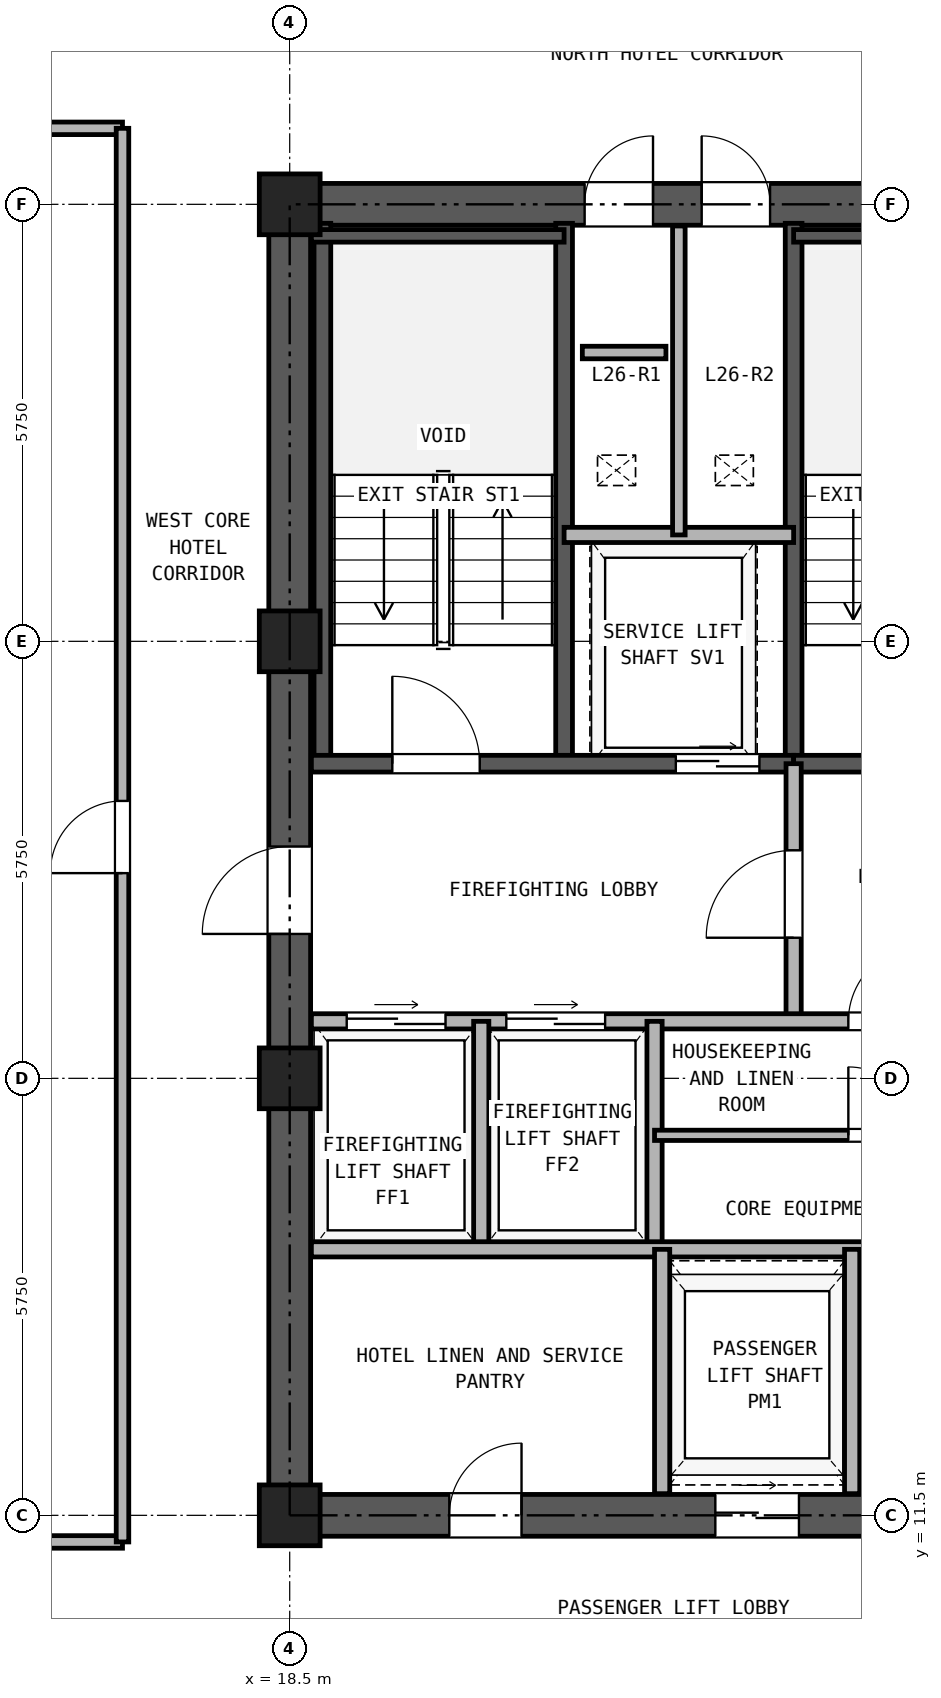
"""IFC4 building model, lengths in metres.
Left out: names, types, materials, properties, quantities, classifications, styles, units other than length and angle.
Written with IfcOpenShell. Run it as: python <this file> out.ifc"""

import sys

from ifc_helpers import new_model, si_unit, direction, frame, frame_2d, origin, origin_2d, place, context, subcontext, project, spatial, rectangle, hollow_rectangle, extrude, source, transform, mapped, element, fill, save


model = new_model("IFC4")
c1 = context("Model", 3, precision=1e-05, world=origin(), true_north=direction((0.0, 1.0)))
c2 = subcontext(c1, "Body", "Model", "MODEL_VIEW")
j1 = project(units=[si_unit("LENGTHUNIT", "METRE"), si_unit("PLANEANGLEUNIT", "RADIAN")], contexts=[c1])
p1 = place(None, origin())
s1 = spatial("IfcSite", under=j1, at=p1, CompositionType="ELEMENT")
p2 = place(p1, origin())
s2 = spatial("IfcBuilding", under=s1, at=p2, CompositionType="ELEMENT")
p3 = place(p2, frame((0.0, 0.0, 99.1)))
s3 = spatial("IfcBuildingStorey", under=s2, at=p3, CompositionType="ELEMENT", Elevation=99.1)
m1 = source(origin(), c2, "Body", "SweptSolid", [
    extrude(hollow_rectangle(XDim=0.8, YDim=0.8, WallThickness=0.045, at=origin_2d()), origin(), (0.0, 0.0, 1.0), 2.95),
])
for number, where, z_axis, x_axis in (
    (1, (18.5, 11.5, 0.0), (0.0, 0.0, 1.0), (1.0, 0.0, 0.0)),
    (2, (18.5, 17.25, 0.0), (0.0, 0.0, 1.0), (1.0, 0.0, 0.0)),
    (3, (18.5, 23.0, 0.0), (0.0, 0.0, 1.0), (1.0, 0.0, 0.0)),
    (4, (18.5, 28.75, 0.0), (0.0, 0.0, 1.0), (1.0, 0.0, 0.0)),
):
    element("IfcColumn", number, at=place(p3, frame(where, z_axis=z_axis, x_axis=x_axis)), inside=s3, PredefinedType="COLUMN", context=c2, shape_type="MappedRepresentation", body=[
        mapped(m1, transform((0.0, 0.0, 0.0), x_axis=(1.0, 0.0, 0.0), y_axis=(0.0, 1.0, 0.0), z_axis=(0.0, 0.0, 1.0), scale=1.0)),
    ])
p4 = place(p3, frame((18.225, 11.5, 0.0), z_axis=(0.0, 0.0, 1.0), x_axis=(1.0, 0.0, 0.0)))
e5 = element("IfcWall", 5, at=p4, inside=s3, PredefinedType="SHEAR", context=c2, shape_type="SweptSolid", body=[
    extrude(rectangle(XDim=10.55, YDim=0.55, at=frame_2d((5.275, 0.0))), origin(), (0.0, 0.0, 1.0), 2.95),
])
p5 = place(p4, frame((2.375, 0.0, 0.0)))
e6 = element("IfcOpeningElement", 6, at=p5, cuts=e5, PredefinedType="OPENING", context=c2, shape_type="SweptSolid", body=[
    extrude(rectangle(XDim=0.95, YDim=2.15, at=frame_2d((0.475, 1.075))), frame((0.0, 0.285, 0.0), z_axis=(0.0, -1.0, 0.0), x_axis=(1.0, 0.0, 0.0)), (0.0, 0.0, 1.0), 0.57),
])
p6 = place(p4, frame((5.875, 0.0, 0.0)))
e7 = element("IfcOpeningElement", 7, at=p6, cuts=e5, PredefinedType="OPENING", context=c2, shape_type="SweptSolid", body=[
    extrude(rectangle(XDim=1.1, YDim=2.25, at=frame_2d((0.55, 1.125))), frame((0.0, 0.285, 0.0), z_axis=(0.0, -1.0, 0.0), x_axis=(1.0, 0.0, 0.0)), (0.0, 0.0, 1.0), 0.57),
])
p7 = place(p4, frame((8.275, 0.0, 0.0)))
e8 = element("IfcOpeningElement", 8, at=p7, cuts=e5, PredefinedType="OPENING", context=c2, shape_type="SweptSolid", body=[
    extrude(rectangle(XDim=1.1, YDim=2.25, at=frame_2d((0.55, 1.125))), frame((0.0, 0.285, 0.0), z_axis=(0.0, -1.0, 0.0), x_axis=(1.0, 0.0, 0.0)), (0.0, 0.0, 1.0), 0.57),
])
p8 = place(p3, frame((18.225, 28.75, 0.0), z_axis=(0.0, 0.0, 1.0), x_axis=(1.0, 0.0, 0.0)))
e9 = element("IfcWall", 9, at=p8, inside=s3, PredefinedType="SHEAR", context=c2, shape_type="SweptSolid", body=[
    extrude(rectangle(XDim=10.55, YDim=0.55, at=frame_2d((5.275, 0.0))), origin(), (0.0, 0.0, 1.0), 2.95),
])
p9 = place(p8, frame((4.155, 0.0, 0.0)))
e10 = element("IfcOpeningElement", 10, at=p9, cuts=e9, PredefinedType="OPENING", context=c2, shape_type="SweptSolid", body=[
    extrude(rectangle(XDim=0.9, YDim=2.05, at=frame_2d((0.45, 1.025))), frame((0.0, 0.285, 0.0), z_axis=(0.0, -1.0, 0.0), x_axis=(1.0, 0.0, 0.0)), (0.0, 0.0, 1.0), 0.57),
])
p10 = place(p8, frame((5.695, 0.0, 0.0)))
e11 = element("IfcOpeningElement", 11, at=p10, cuts=e9, PredefinedType="OPENING", context=c2, shape_type="SweptSolid", body=[
    extrude(rectangle(XDim=0.9, YDim=2.05, at=frame_2d((0.45, 1.025))), frame((0.0, 0.285, 0.0), z_axis=(0.0, -1.0, 0.0), x_axis=(1.0, 0.0, 0.0)), (0.0, 0.0, 1.0), 0.57),
])
p11 = place(p3, frame((18.5, 11.775, 0.0), z_axis=(0.0, 0.0, 1.0), x_axis=(0.0, 1.0, 0.0)))
e12 = element("IfcWall", 12, at=p11, inside=s3, PredefinedType="SHEAR", context=c2, shape_type="SweptSolid", body=[
    extrude(rectangle(XDim=16.7, YDim=0.55, at=frame_2d((8.35, 0.0))), origin(), (0.0, 0.0, 1.0), 2.95),
])
p12 = place(p11, frame((7.375, 0.0, 0.0)))
e13 = element("IfcOpeningElement", 13, at=p12, cuts=e12, PredefinedType="OPENING", context=c2, shape_type="SweptSolid", body=[
    extrude(rectangle(XDim=1.15, YDim=2.2, at=frame_2d((0.575, 1.1))), frame((0.0, 0.285, 0.0), z_axis=(0.0, -1.0, 0.0), x_axis=(1.0, 0.0, 0.0)), (0.0, 0.0, 1.0), 0.57),
])
for number, where, z_axis, x_axis in (
    (14, (18.93, 21.39, 0.0), (0.0, 0.0, 1.0), (0.0, 1.0, 0.0)),
    (15, (22.11, 21.39, 0.0), (0.0, 0.0, 1.0), (0.0, 1.0, 0.0)),
    (16, (25.13, 21.39, 0.0), (0.0, 0.0, 1.0), (0.0, 1.0, 0.0)),
):
    element("IfcWall", number, at=place(p3, frame(where, z_axis=z_axis, x_axis=x_axis)), inside=s3, PredefinedType="SOLIDWALL", context=c2, shape_type="SweptSolid", body=[
        extrude(rectangle(XDim=7.11, YDim=0.22, at=frame_2d((3.555, 0.0))), origin(), (0.0, 0.0, 1.0), 2.95),
    ])
p13 = place(p3, frame((18.785, 28.335, 0.0), z_axis=(0.0, 0.0, 1.0), x_axis=(1.0, 0.0, 0.0)))
e17 = element("IfcWall", 17, at=p13, inside=s3, PredefinedType="PARTITIONING", context=c2, shape_type="SweptSolid", body=[
    extrude(rectangle(XDim=3.325, YDim=0.165, at=frame_2d((1.663, 0.0))), origin(), (0.0, 0.0, 1.0), 2.95),
])
p14 = place(p3, frame((25.13, 28.335, 0.0), z_axis=(0.0, 0.0, 1.0), x_axis=(1.0, 0.0, 0.0)))
e18 = element("IfcWall", 18, at=p14, inside=s3, PredefinedType="PARTITIONING", context=c2, shape_type="SweptSolid", body=[
    extrude(rectangle(XDim=3.085, YDim=0.165, at=frame_2d((1.542, 0.0))), origin(), (0.0, 0.0, 1.0), 2.95),
])
p15 = place(p3, frame((18.785, 21.39, 0.0), z_axis=(0.0, 0.0, 1.0), x_axis=(1.0, 0.0, 0.0)))
e19 = element("IfcWall", 19, at=p15, inside=s3, PredefinedType="SOLIDWALL", context=c2, shape_type="SweptSolid", body=[
    extrude(rectangle(XDim=6.345, YDim=0.22, at=frame_2d((3.172, 0.0))), origin(), (0.0, 0.0, 1.0), 2.95),
])
p16 = place(p15, frame((1.065, 0.0, 0.0)))
e20 = element("IfcOpeningElement", 20, at=p16, cuts=e19, PredefinedType="OPENING", context=c2, shape_type="SweptSolid", body=[
    extrude(rectangle(XDim=1.15, YDim=2.2, at=frame_2d((0.575, 1.1))), frame((0.0, 0.12, 0.0), z_axis=(0.0, -1.0, 0.0), x_axis=(1.0, 0.0, 0.0)), (0.0, 0.0, 1.0), 0.24),
])
p17 = place(p15, frame((4.795, 0.0, 0.0)))
e21 = element("IfcOpeningElement", 21, at=p17, cuts=e19, PredefinedType="OPENING", context=c2, shape_type="SweptSolid", body=[
    extrude(rectangle(XDim=1.1, YDim=2.25, at=frame_2d((0.55, 1.125))), frame((0.0, 0.12, 0.0), z_axis=(0.0, -1.0, 0.0), x_axis=(1.0, 0.0, 0.0)), (0.0, 0.0, 1.0), 0.24),
])
p18 = place(p3, frame((25.13, 21.39, 0.0), z_axis=(0.0, 0.0, 1.0), x_axis=(1.0, 0.0, 0.0)))
e22 = element("IfcWall", 22, at=p18, inside=s3, PredefinedType="SOLIDWALL", context=c2, shape_type="SweptSolid", body=[
    extrude(rectangle(XDim=3.085, YDim=0.22, at=frame_2d((1.542, 0.0))), origin(), (0.0, 0.0, 1.0), 2.95),
])
p19 = place(p18, frame((0.92, 0.0, 0.0)))
e23 = element("IfcOpeningElement", 23, at=p19, cuts=e22, PredefinedType="OPENING", context=c2, shape_type="SweptSolid", body=[
    extrude(rectangle(XDim=1.15, YDim=2.2, at=frame_2d((0.575, 1.1))), frame((0.0, 0.12, 0.0), z_axis=(0.0, -1.0, 0.0), x_axis=(1.0, 0.0, 0.0)), (0.0, 0.0, 1.0), 0.24),
])
p20 = place(p3, frame((22.11, 24.4, 0.0), z_axis=(0.0, 0.0, 1.0), x_axis=(1.0, 0.0, 0.0)))
e24 = element("IfcWall", 24, at=p20, inside=s3, PredefinedType="PARTITIONING", context=c2, shape_type="SweptSolid", body=[
    extrude(rectangle(XDim=3.02, YDim=0.2, at=frame_2d((1.51, 0.0))), origin(), (0.0, 0.0, 1.0), 2.95),
])
p21 = place(p3, frame((23.62, 24.4, 0.0), z_axis=(0.0, 0.0, 1.0), x_axis=(0.0, 1.0, 0.0)))
e25 = element("IfcWall", 25, at=p21, inside=s3, PredefinedType="PARTITIONING", context=c2, shape_type="SweptSolid", body=[
    extrude(rectangle(XDim=4.065, YDim=0.165, at=frame_2d((2.033, 0.0))), origin(), (0.0, 0.0, 1.0), 2.95),
])
p22 = place(p3, frame((25.13, 18.0, 0.0), z_axis=(0.0, 0.0, 1.0), x_axis=(0.0, 1.0, 0.0)))
e26 = element("IfcWall", 26, at=p22, inside=s3, PredefinedType="PARTITIONING", context=c2, shape_type="SweptSolid", body=[
    extrude(rectangle(XDim=3.39, YDim=0.2, at=frame_2d((1.695, 0.0))), origin(), (0.0, 0.0, 1.0), 2.95),
])
p23 = place(p22, frame((1.1, 0.0, 0.0)))
e27 = element("IfcOpeningElement", 27, at=p23, cuts=e26, PredefinedType="OPENING", context=c2, shape_type="SweptSolid", body=[
    extrude(rectangle(XDim=1.15, YDim=2.2, at=frame_2d((0.575, 1.1))), frame((0.0, 0.11, 0.0), z_axis=(0.0, -1.0, 0.0), x_axis=(1.0, 0.0, 0.0)), (0.0, 0.0, 1.0), 0.22),
])
p24 = place(p3, frame((18.785, 18.0, 0.0), z_axis=(0.0, 0.0, 1.0), x_axis=(1.0, 0.0, 0.0)))
e28 = element("IfcWall", 28, at=p24, inside=s3, PredefinedType="PARTITIONING", context=c2, shape_type="SweptSolid", body=[
    extrude(rectangle(XDim=9.43, YDim=0.2, at=frame_2d((4.715, 0.0))), origin(), (0.0, 0.0, 1.0), 2.95),
])
p25 = place(p24, frame((0.465, 0.0, 0.0)))
e29 = element("IfcOpeningElement", 29, at=p25, cuts=e28, PredefinedType="OPENING", context=c2, shape_type="SweptSolid", body=[
    extrude(rectangle(XDim=1.3, YDim=2.3, at=frame_2d((0.65, 1.15))), frame((0.0, 0.11, 0.0), z_axis=(0.0, -1.0, 0.0), x_axis=(1.0, 0.0, 0.0)), (0.0, 0.0, 1.0), 0.22),
])
p26 = place(p24, frame((2.565, 0.0, 0.0)))
e30 = element("IfcOpeningElement", 30, at=p26, cuts=e28, PredefinedType="OPENING", context=c2, shape_type="SweptSolid", body=[
    extrude(rectangle(XDim=1.3, YDim=2.3, at=frame_2d((0.65, 1.15))), frame((0.0, 0.11, 0.0), z_axis=(0.0, -1.0, 0.0), x_axis=(1.0, 0.0, 0.0)), (0.0, 0.0, 1.0), 0.22),
])
p27 = place(p24, frame((7.065, 0.0, 0.0)))
e31 = element("IfcOpeningElement", 31, at=p27, cuts=e28, PredefinedType="OPENING", context=c2, shape_type="SweptSolid", body=[
    extrude(rectangle(XDim=1.0, YDim=2.15, at=frame_2d((0.5, 1.075))), frame((0.0, 0.11, 0.0), z_axis=(0.0, -1.0, 0.0), x_axis=(1.0, 0.0, 0.0)), (0.0, 0.0, 1.0), 0.22),
])
for number, where, z_axis, x_axis in (
    (32, (21.02, 15.0, 0.0), (0.0, 0.0, 1.0), (0.0, 1.0, 0.0)),
    (33, (23.3, 15.0, 0.0), (0.0, 0.0, 1.0), (0.0, 1.0, 0.0)),
):
    element("IfcWall", number, at=place(p3, frame(where, z_axis=z_axis, x_axis=x_axis)), inside=s3, PredefinedType="PARTITIONING", context=c2, shape_type="SweptSolid", body=[
        extrude(rectangle(XDim=3.0, YDim=0.2, at=frame_2d((1.5, 0.0))), origin(), (0.0, 0.0, 1.0), 2.95),
    ])
p28 = place(p3, frame((18.785, 15.0, 0.0), z_axis=(0.0, 0.0, 1.0), x_axis=(1.0, 0.0, 0.0)))
e34 = element("IfcWall", 34, at=p28, inside=s3, PredefinedType="PARTITIONING", context=c2, shape_type="SweptSolid", body=[
    extrude(rectangle(XDim=9.43, YDim=0.2, at=frame_2d((4.715, 0.0))), origin(), (0.0, 0.0, 1.0), 2.95),
])
p29 = place(p3, frame((23.3, 16.5, 0.0), z_axis=(0.0, 0.0, 1.0), x_axis=(1.0, 0.0, 0.0)))
e35 = element("IfcWall", 35, at=p29, inside=s3, PredefinedType="PARTITIONING", context=c2, shape_type="SweptSolid", body=[
    extrude(rectangle(XDim=4.915, YDim=0.135, at=frame_2d((2.458, 0.0))), origin(), (0.0, 0.0, 1.0), 2.95),
])
p30 = place(p29, frame((2.55, 0.0, 0.0)))
e36 = element("IfcOpeningElement", 36, at=p30, cuts=e35, PredefinedType="OPENING", context=c2, shape_type="SweptSolid", body=[
    extrude(rectangle(XDim=0.9, YDim=2.05, at=frame_2d((0.45, 1.025))), frame((0.0, 0.077, 0.0), z_axis=(0.0, -1.0, 0.0), x_axis=(1.0, 0.0, 0.0)), (0.0, 0.0, 1.0), 0.155),
])
for number, where, z_axis, x_axis in (
    (37, (23.4, 11.785, 0.0), (0.0, 0.0, 1.0), (0.0, 1.0, 0.0)),
    (38, (25.9, 11.785, 0.0), (0.0, 0.0, 1.0), (0.0, 1.0, 0.0)),
):
    element("IfcWall", number, at=place(p3, frame(where, z_axis=z_axis, x_axis=x_axis)), inside=s3, PredefinedType="PARTITIONING", context=c2, shape_type="SweptSolid", body=[
        extrude(rectangle(XDim=3.215, YDim=0.2, at=frame_2d((1.607, 0.0))), origin(), (0.0, 0.0, 1.0), 2.95),
    ])
for number, where, z_axis, x_axis in (
    (39, (9.2, 11.15, 0.0), (0.0, 0.0, 1.0), (1.0, 0.0, 0.0)),
    (40, (9.2, 29.75, 0.0), (0.0, 0.0, 1.0), (1.0, 0.0, 0.0)),
):
    element("IfcWall", number, at=place(p3, frame(where, z_axis=z_axis, x_axis=x_axis)), inside=s3, PredefinedType="PARTITIONING", context=c2, shape_type="SweptSolid", body=[
        extrude(rectangle(XDim=7.1, YDim=0.165, at=frame_2d((3.55, 0.0))), origin(), (0.0, 0.0, 1.0), 2.95),
    ])
p31 = place(p3, frame((16.3, 11.15, 0.0), z_axis=(0.0, 0.0, 1.0), x_axis=(0.0, 1.0, 0.0)))
e41 = element("IfcWall", 41, at=p31, inside=s3, PredefinedType="PARTITIONING", context=c2, shape_type="SweptSolid", body=[
    extrude(rectangle(XDim=18.6, YDim=0.165, at=frame_2d((9.3, 0.0))), origin(), (0.0, 0.0, 1.0), 2.95),
])
p32 = place(p31, frame((8.8, 0.0, 0.0)))
e42 = element("IfcOpeningElement", 42, at=p32, cuts=e41, PredefinedType="OPENING", context=c2, shape_type="SweptSolid", body=[
    extrude(rectangle(XDim=0.95, YDim=2.15, at=frame_2d((0.475, 1.075))), frame((0.0, 0.093, 0.0), z_axis=(0.0, -1.0, 0.0), x_axis=(1.0, 0.0, 0.0)), (0.0, 0.0, 1.0), 0.185),
])
p33 = place(p3, frame((22.35, 26.8, 0.0), z_axis=(0.0, 0.0, 1.0), x_axis=(1.0, 0.0, 0.0)))
e43 = element("IfcWall", 43, at=p33, inside=s3, PredefinedType="PARTITIONING", context=c2, shape_type="SweptSolid", body=[
    extrude(rectangle(XDim=1.1, YDim=0.165, at=frame_2d((0.55, 0.0))), origin(), (0.0, 0.0, 1.0), 2.95),
])
p34 = place(p16, frame((1.15, 0.0, 0.0), z_axis=(0.0, 0.0, 1.0), x_axis=(-1.0, 0.0, 0.0)))
e44 = element("IfcDoor", 44, at=p34, inside=s3, OperationType="SINGLE_SWING_LEFT", PredefinedType="DOOR", context=c2, shape_type="SweptSolid", body=[
    extrude(rectangle(XDim=1.15, YDim=2.2, at=frame_2d((0.575, 1.1))), frame((0.0, 0.025, 0.0), z_axis=(0.0, -1.0, 0.0), x_axis=(1.0, 0.0, 0.0)), (0.0, 0.0, 1.0), 0.05),
])
fill(e20, e44)
p35 = place(p17, frame((1.1, 0.0, 0.0), z_axis=(0.0, 0.0, 1.0), x_axis=(-1.0, 0.0, 0.0)))
e45 = element("IfcDoor", 45, at=p35, inside=s3, OperationType="DOUBLE_DOOR_SLIDING", PredefinedType="DOOR", context=c2, shape_type="SweptSolid", body=[
    extrude(rectangle(XDim=1.1, YDim=2.25, at=frame_2d((0.55, 1.125))), frame((0.0, 0.025, 0.0), z_axis=(0.0, -1.0, 0.0), x_axis=(1.0, 0.0, 0.0)), (0.0, 0.0, 1.0), 0.05),
])
fill(e21, e45)
p36 = place(p23, origin())
e46 = element("IfcDoor", 46, at=p36, inside=s3, OperationType="SINGLE_SWING_LEFT", PredefinedType="DOOR", context=c2, shape_type="SweptSolid", body=[
    extrude(rectangle(XDim=1.15, YDim=2.2, at=frame_2d((0.575, 1.1))), frame((0.0, 0.025, 0.0), z_axis=(0.0, -1.0, 0.0), x_axis=(1.0, 0.0, 0.0)), (0.0, 0.0, 1.0), 0.05),
])
fill(e27, e46)
p37 = place(p25, origin())
e47 = element("IfcDoor", 47, at=p37, inside=s3, OperationType="DOUBLE_DOOR_SLIDING", PredefinedType="DOOR", context=c2, shape_type="SweptSolid", body=[
    extrude(rectangle(XDim=1.3, YDim=2.3, at=frame_2d((0.65, 1.15))), frame((0.0, 0.025, 0.0), z_axis=(0.0, -1.0, 0.0), x_axis=(1.0, 0.0, 0.0)), (0.0, 0.0, 1.0), 0.05),
])
fill(e29, e47)
p38 = place(p26, origin())
e48 = element("IfcDoor", 48, at=p38, inside=s3, OperationType="DOUBLE_DOOR_SLIDING", PredefinedType="DOOR", context=c2, shape_type="SweptSolid", body=[
    extrude(rectangle(XDim=1.3, YDim=2.3, at=frame_2d((0.65, 1.15))), frame((0.0, 0.025, 0.0), z_axis=(0.0, -1.0, 0.0), x_axis=(1.0, 0.0, 0.0)), (0.0, 0.0, 1.0), 0.05),
])
fill(e30, e48)
p39 = place(p27, frame((1.0, 0.0, 0.0), z_axis=(0.0, 0.0, 1.0), x_axis=(-1.0, 0.0, 0.0)))
e49 = element("IfcDoor", 49, at=p39, inside=s3, OperationType="SINGLE_SWING_RIGHT", PredefinedType="DOOR", context=c2, shape_type="SweptSolid", body=[
    extrude(rectangle(XDim=1.0, YDim=2.15, at=frame_2d((0.5, 1.075))), frame((0.0, 0.025, 0.0), z_axis=(0.0, -1.0, 0.0), x_axis=(1.0, 0.0, 0.0)), (0.0, 0.0, 1.0), 0.05),
])
fill(e31, e49)
p40 = place(p30, frame((0.9, 0.0, 0.0), z_axis=(0.0, 0.0, 1.0), x_axis=(-1.0, 0.0, 0.0)))
e50 = element("IfcDoor", 50, at=p40, inside=s3, OperationType="SINGLE_SWING_LEFT", PredefinedType="DOOR", context=c2, shape_type="SweptSolid", body=[
    extrude(rectangle(XDim=0.9, YDim=2.05, at=frame_2d((0.45, 1.025))), frame((0.0, 0.025, 0.0), z_axis=(0.0, -1.0, 0.0), x_axis=(1.0, 0.0, 0.0)), (0.0, 0.0, 1.0), 0.05),
])
fill(e36, e50)
p41 = place(p12, frame((1.15, 0.0, 0.0), z_axis=(0.0, 0.0, 1.0), x_axis=(-1.0, 0.0, 0.0)))
e51 = element("IfcDoor", 51, at=p41, inside=s3, OperationType="SINGLE_SWING_LEFT", PredefinedType="DOOR", context=c2, shape_type="SweptSolid", body=[
    extrude(rectangle(XDim=1.15, YDim=2.2, at=frame_2d((0.575, 1.1))), frame((0.0, 0.025, 0.0), z_axis=(0.0, -1.0, 0.0), x_axis=(1.0, 0.0, 0.0)), (0.0, 0.0, 1.0), 0.05),
])
fill(e13, e51)
p42 = place(p9, origin())
e52 = element("IfcDoor", 52, at=p42, inside=s3, OperationType="SINGLE_SWING_RIGHT", PredefinedType="DOOR", context=c2, shape_type="SweptSolid", body=[
    extrude(rectangle(XDim=0.9, YDim=2.05, at=frame_2d((0.45, 1.025))), frame((0.0, 0.025, 0.0), z_axis=(0.0, -1.0, 0.0), x_axis=(1.0, 0.0, 0.0)), (0.0, 0.0, 1.0), 0.05),
])
fill(e10, e52)
p43 = place(p10, origin())
e53 = element("IfcDoor", 53, at=p43, inside=s3, OperationType="SINGLE_SWING_LEFT", PredefinedType="DOOR", context=c2, shape_type="SweptSolid", body=[
    extrude(rectangle(XDim=0.9, YDim=2.05, at=frame_2d((0.45, 1.025))), frame((0.0, 0.025, 0.0), z_axis=(0.0, -1.0, 0.0), x_axis=(1.0, 0.0, 0.0)), (0.0, 0.0, 1.0), 0.05),
])
fill(e11, e53)
p44 = place(p5, frame((0.95, 0.0, 0.0), z_axis=(0.0, 0.0, 1.0), x_axis=(-1.0, 0.0, 0.0)))
e54 = element("IfcDoor", 54, at=p44, inside=s3, OperationType="SINGLE_SWING_RIGHT", PredefinedType="DOOR", context=c2, shape_type="SweptSolid", body=[
    extrude(rectangle(XDim=0.95, YDim=2.15, at=frame_2d((0.475, 1.075))), frame((0.0, 0.025, 0.0), z_axis=(0.0, -1.0, 0.0), x_axis=(1.0, 0.0, 0.0)), (0.0, 0.0, 1.0), 0.05),
])
fill(e6, e54)
p45 = place(p6, frame((1.1, 0.0, 0.0), z_axis=(0.0, 0.0, 1.0), x_axis=(-1.0, 0.0, 0.0)))
e55 = element("IfcDoor", 55, at=p45, inside=s3, OperationType="DOUBLE_DOOR_SLIDING", PredefinedType="DOOR", context=c2, shape_type="SweptSolid", body=[
    extrude(rectangle(XDim=1.1, YDim=2.25, at=frame_2d((0.55, 1.125))), frame((0.0, 0.025, 0.0), z_axis=(0.0, -1.0, 0.0), x_axis=(1.0, 0.0, 0.0)), (0.0, 0.0, 1.0), 0.05),
])
fill(e7, e55)
p46 = place(p32, frame((0.95, 0.0, 0.0), z_axis=(0.0, 0.0, 1.0), x_axis=(-1.0, 0.0, 0.0)))
e56 = element("IfcDoor", 56, at=p46, inside=s3, OperationType="SINGLE_SWING_LEFT", PredefinedType="DOOR", context=c2, shape_type="SweptSolid", body=[
    extrude(rectangle(XDim=0.95, YDim=2.15, at=frame_2d((0.475, 1.075))), frame((0.0, 0.025, 0.0), z_axis=(0.0, -1.0, 0.0), x_axis=(1.0, 0.0, 0.0)), (0.0, 0.0, 1.0), 0.05),
])
fill(e42, e56)
save(model, sys.argv[1])
